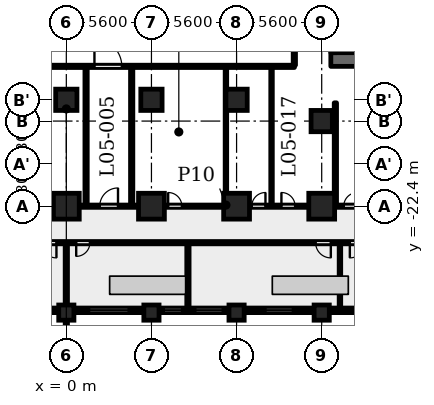
"""IFC4 building model, lengths in metres.
Left out: names, types, materials, properties, quantities, classifications, styles, units other than length and angle.
Written with IfcOpenShell. Run it as: python <this file> out.ifc"""

import sys

from ifc_helpers import new_model, si_unit, direction, frame, frame_2d, origin, origin_2d, place, context, subcontext, project, spatial, rectangle, circle, extrude, element, fill, save


model = new_model("IFC4")
c1 = context("Model", 3, precision=1e-05, world=origin(), true_north=direction((0.0, 1.0)))
c2 = subcontext(c1, "Body", "Model", "MODEL_VIEW")
j1 = project(units=[si_unit("LENGTHUNIT", "METRE"), si_unit("PLANEANGLEUNIT", "RADIAN")], contexts=[c1])
p1 = place(None, origin())
s1 = spatial("IfcSite", under=j1, at=p1, CompositionType="ELEMENT")
p2 = place(p1, origin())
s2 = spatial("IfcBuilding", under=s1, at=p2, CompositionType="ELEMENT")
p3 = place(p2, frame((0.0, 0.0, 25.7)))
s3 = spatial("IfcBuildingStorey", under=s2, at=p3, CompositionType="ELEMENT", Elevation=25.7)
for number, where, z_axis, x_axis in (
    (1, (0.0, -22.4, 0.0), (0.0, 0.0, 1.0), (1.0, 0.0, 0.0)),
    (2, (5.6, -22.4, 0.0), (0.0, 0.0, 1.0), (1.0, 0.0, 0.0)),
    (3, (11.2, -22.4, 0.0), (0.0, 0.0, 1.0), (1.0, 0.0, 0.0)),
    (4, (16.8, -22.4, 0.0), (0.0, 0.0, 1.0), (1.0, 0.0, 0.0)),
):
    element("IfcColumn", number, at=place(p3, frame(where, z_axis=z_axis, x_axis=x_axis)), inside=s3, PredefinedType="COLUMN", context=c2, shape_type="SweptSolid", body=[
        extrude(rectangle(XDim=1.7, YDim=1.7, at=origin_2d()), origin(), (0.0, 0.0, 1.0), 4.8),
    ])
for number, where, z_axis, x_axis in (
    (5, (16.8, -16.8, 0.0), (0.0, 0.0, 1.0), (1.0, 0.0, 0.0)),
    (6, (0.0, -15.4, 0.0), (0.0, 0.0, 1.0), (1.0, 0.0, 0.0)),
    (7, (5.6, -15.4, 0.0), (0.0, 0.0, 1.0), (1.0, 0.0, 0.0)),
    (8, (11.2, -15.4, 0.0), (0.0, 0.0, 1.0), (1.0, 0.0, 0.0)),
):
    element("IfcColumn", number, at=place(p3, frame(where, z_axis=z_axis, x_axis=x_axis)), inside=s3, PredefinedType="COLUMN", context=c2, shape_type="SweptSolid", body=[
        extrude(rectangle(XDim=1.4, YDim=1.4, at=origin_2d()), origin(), (0.0, 0.0, 1.0), 4.8),
    ])
for number, where, z_axis, x_axis in (
    (9, (0.0, -29.4, 0.0), (0.0, 0.0, 1.0), (1.0, 0.0, 0.0)),
    (10, (5.6, -29.4, 0.0), (0.0, 0.0, 1.0), (1.0, 0.0, 0.0)),
    (11, (11.2, -29.4, 0.0), (0.0, 0.0, 1.0), (1.0, 0.0, 0.0)),
    (12, (16.8, -29.4, 0.0), (0.0, 0.0, 1.0), (1.0, 0.0, 0.0)),
):
    element("IfcColumn", number, at=place(p3, frame(where, z_axis=z_axis, x_axis=x_axis)), inside=s3, PredefinedType="COLUMN", context=c2, shape_type="SweptSolid", body=[
        extrude(circle(Radius=0.5, at=origin_2d()), origin(), (0.0, 0.0, 1.0), 4.8),
    ])
p4 = place(p3, frame((-5.1, -29.25, 0.0), z_axis=(0.0, 0.0, 1.0), x_axis=(1.0, 0.0, 0.0)))
e13 = element("IfcWall", 13, at=p4, inside=s3, PredefinedType="SOLIDWALL", context=c2, shape_type="SweptSolid", body=[
    extrude(rectangle(XDim=4.6, YDim=0.3, at=frame_2d((2.3, 0.0))), origin(), (0.0, 0.0, 1.0), 3.65),
])
p5 = place(p4, frame((1.0, 0.0, 0.9)))
e14 = element("IfcOpeningElement", 14, at=p5, cuts=e13, PredefinedType="OPENING", context=c2, shape_type="SweptSolid", body=[
    extrude(rectangle(XDim=2.6, YDim=1.25, at=frame_2d((1.3, 0.625))), frame((0.0, 0.16, 0.0), z_axis=(0.0, -1.0, 0.0), x_axis=(1.0, 0.0, 0.0)), (0.0, 0.0, 1.0), 0.32),
])
p6 = place(p3, frame((0.5, -29.25, 0.0), z_axis=(0.0, 0.0, 1.0), x_axis=(1.0, 0.0, 0.0)))
e15 = element("IfcWall", 15, at=p6, inside=s3, PredefinedType="SOLIDWALL", context=c2, shape_type="SweptSolid", body=[
    extrude(rectangle(XDim=4.6, YDim=0.3, at=frame_2d((2.3, 0.0))), origin(), (0.0, 0.0, 1.0), 3.65),
])
p7 = place(p6, frame((1.0, 0.0, 0.9)))
e16 = element("IfcOpeningElement", 16, at=p7, cuts=e15, PredefinedType="OPENING", context=c2, shape_type="SweptSolid", body=[
    extrude(rectangle(XDim=2.6, YDim=1.25, at=frame_2d((1.3, 0.625))), frame((0.0, 0.16, 0.0), z_axis=(0.0, -1.0, 0.0), x_axis=(1.0, 0.0, 0.0)), (0.0, 0.0, 1.0), 0.32),
])
p8 = place(p3, frame((6.1, -29.25, 0.0), z_axis=(0.0, 0.0, 1.0), x_axis=(1.0, 0.0, 0.0)))
e17 = element("IfcWall", 17, at=p8, inside=s3, PredefinedType="SOLIDWALL", context=c2, shape_type="SweptSolid", body=[
    extrude(rectangle(XDim=4.6, YDim=0.3, at=frame_2d((2.3, 0.0))), origin(), (0.0, 0.0, 1.0), 3.65),
])
p9 = place(p8, frame((0.312, 0.0, 0.6)))
e18 = element("IfcOpeningElement", 18, at=p9, cuts=e17, PredefinedType="OPENING", context=c2, shape_type="SweptSolid", body=[
    extrude(rectangle(XDim=1.2, YDim=1.55, at=frame_2d((0.6, 0.775))), frame((0.0, 0.16, 0.0), z_axis=(0.0, -1.0, 0.0), x_axis=(1.0, 0.0, 0.0)), (0.0, 0.0, 1.0), 0.32),
])
p10 = place(p8, frame((2.387, 0.0, 0.9)))
e19 = element("IfcOpeningElement", 19, at=p10, cuts=e17, PredefinedType="OPENING", context=c2, shape_type="SweptSolid", body=[
    extrude(rectangle(XDim=1.8, YDim=1.25, at=frame_2d((0.9, 0.625))), frame((0.0, 0.16, 0.0), z_axis=(0.0, -1.0, 0.0), x_axis=(1.0, 0.0, 0.0)), (0.0, 0.0, 1.0), 0.32),
])
p11 = place(p3, frame((11.7, -29.25, 0.0), z_axis=(0.0, 0.0, 1.0), x_axis=(1.0, 0.0, 0.0)))
e20 = element("IfcWall", 20, at=p11, inside=s3, PredefinedType="SOLIDWALL", context=c2, shape_type="SweptSolid", body=[
    extrude(rectangle(XDim=4.6, YDim=0.3, at=frame_2d((2.3, 0.0))), origin(), (0.0, 0.0, 1.0), 3.65),
])
p12 = place(p11, frame((1.4, 0.0, 0.9)))
e21 = element("IfcOpeningElement", 21, at=p12, cuts=e20, PredefinedType="OPENING", context=c2, shape_type="SweptSolid", body=[
    extrude(rectangle(XDim=1.8, YDim=1.25, at=frame_2d((0.9, 0.625))), frame((0.0, 0.16, 0.0), z_axis=(0.0, -1.0, 0.0), x_axis=(1.0, 0.0, 0.0)), (0.0, 0.0, 1.0), 0.32),
])
p13 = place(p3, frame((17.3, -29.25, 0.0), z_axis=(0.0, 0.0, 1.0), x_axis=(1.0, 0.0, 0.0)))
e22 = element("IfcWall", 22, at=p13, inside=s3, PredefinedType="SOLIDWALL", context=c2, shape_type="SweptSolid", body=[
    extrude(rectangle(XDim=4.6, YDim=0.3, at=frame_2d((2.3, 0.0))), origin(), (0.0, 0.0, 1.0), 3.65),
])
p14 = place(p13, frame((1.788, 0.0, 0.9)))
e23 = element("IfcOpeningElement", 23, at=p14, cuts=e22, PredefinedType="OPENING", context=c2, shape_type="SweptSolid", body=[
    extrude(rectangle(XDim=1.8, YDim=1.25, at=frame_2d((0.9, 0.625))), frame((0.0, 0.16, 0.0), z_axis=(0.0, -1.0, 0.0), x_axis=(1.0, 0.0, 0.0)), (0.0, 0.0, 1.0), 0.32),
])
p15 = place(p3, frame((17.4, -12.75, 0.0), z_axis=(0.0, 0.0, 1.0), x_axis=(1.0, 0.0, 0.0)))
e24 = element("IfcWall", 24, at=p15, inside=s3, PredefinedType="SHEAR", context=c2, shape_type="SweptSolid", body=[
    extrude(rectangle(XDim=10.4, YDim=0.9, at=frame_2d((5.2, 0.0))), origin(), (0.0, 0.0, 1.0), 4.45),
])
p16 = place(p3, frame((17.6, -12.3, 0.0), z_axis=(0.0, 0.0, 1.0), x_axis=(0.0, 1.0, 0.0)))
e25 = element("IfcWall", 25, at=p16, inside=s3, PredefinedType="SHEAR", context=c2, shape_type="SweptSolid", body=[
    extrude(rectangle(XDim=24.6, YDim=0.4, at=frame_2d((12.3, 0.0))), origin(), (0.0, 0.0, 1.0), 4.45),
])
p17 = place(p16, frame((6.0, 0.0, 0.0)))
e26 = element("IfcOpeningElement", 26, at=p17, cuts=e25, PredefinedType="OPENING", context=c2, shape_type="SweptSolid", body=[
    extrude(rectangle(XDim=1.1, YDim=2.1, at=frame_2d((0.55, 1.05))), frame((0.0, 0.21, 0.0), z_axis=(0.0, -1.0, 0.0), x_axis=(1.0, 0.0, 0.0)), (0.0, 0.0, 1.0), 0.42),
])
p18 = place(p16, frame((8.4, 0.0, 0.0)))
e27 = element("IfcOpeningElement", 27, at=p18, cuts=e25, PredefinedType="OPENING", context=c2, shape_type="SweptSolid", body=[
    extrude(rectangle(XDim=1.1, YDim=2.1, at=frame_2d((0.55, 1.05))), frame((0.0, 0.21, 0.0), z_axis=(0.0, -1.0, 0.0), x_axis=(1.0, 0.0, 0.0)), (0.0, 0.0, 1.0), 0.42),
])
p19 = place(p16, frame((10.8, 0.0, 0.0)))
e28 = element("IfcOpeningElement", 28, at=p19, cuts=e25, PredefinedType="OPENING", context=c2, shape_type="SweptSolid", body=[
    extrude(rectangle(XDim=1.1, YDim=2.1, at=frame_2d((0.55, 1.05))), frame((0.0, 0.21, 0.0), z_axis=(0.0, -1.0, 0.0), x_axis=(1.0, 0.0, 0.0)), (0.0, 0.0, 1.0), 0.42),
])
p20 = place(p16, frame((16.75, 0.0, 0.0)))
e29 = element("IfcOpeningElement", 29, at=p20, cuts=e25, PredefinedType="OPENING", context=c2, shape_type="SweptSolid", body=[
    extrude(rectangle(XDim=0.9, YDim=2.1, at=frame_2d((0.45, 1.05))), frame((0.0, 0.21, 0.0), z_axis=(0.0, -1.0, 0.0), x_axis=(1.0, 0.0, 0.0)), (0.0, 0.0, 1.0), 0.42),
])
p21 = place(p16, frame((22.8, 0.0, 0.0)))
e30 = element("IfcOpeningElement", 30, at=p21, cuts=e25, PredefinedType="OPENING", context=c2, shape_type="SweptSolid", body=[
    extrude(rectangle(XDim=1.1, YDim=2.1, at=frame_2d((0.55, 1.05))), frame((0.0, 0.21, 0.0), z_axis=(0.0, -1.0, 0.0), x_axis=(1.0, 0.0, 0.0)), (0.0, 0.0, 1.0), 0.42),
])
p22 = place(p16, frame((0.7, 0.0, 0.0)))
e31 = element("IfcOpeningElement", 31, at=p22, cuts=e25, PredefinedType="OPENING", context=c2, shape_type="SweptSolid", body=[
    extrude(rectangle(XDim=1.1, YDim=2.1, at=frame_2d((0.55, 1.05))), frame((0.0, 0.21, 0.0), z_axis=(0.0, -1.0, 0.0), x_axis=(1.0, 0.0, 0.0)), (0.0, 0.0, 1.0), 0.42),
])
p23 = place(p16, frame((12.775, 0.0, 0.0)))
e32 = element("IfcOpeningElement", 32, at=p23, cuts=e25, PredefinedType="OPENING", context=c2, shape_type="SweptSolid", body=[
    extrude(rectangle(XDim=1.8, YDim=2.1, at=frame_2d((0.9, 1.05))), frame((0.0, 0.21, 0.0), z_axis=(0.0, -1.0, 0.0), x_axis=(1.0, 0.0, 0.0)), (0.0, 0.0, 1.0), 0.42),
])
p24 = place(p3, frame((-37.0, -24.8, 0.0), z_axis=(0.0, 0.0, 1.0), x_axis=(1.0, 0.0, 0.0)))
e33 = element("IfcWall", 33, at=p24, inside=s3, PredefinedType="PARTITIONING", context=c2, shape_type="SweptSolid", body=[
    extrude(rectangle(XDim=74.0, YDim=0.15, at=frame_2d((37.0, 0.0))), origin(), (0.0, 0.0, 1.0), 4.45),
])
p25 = place(p24, frame((6.65, 0.0, 0.0)))
e34 = element("IfcOpeningElement", 34, at=p25, cuts=e33, PredefinedType="OPENING", context=c2, shape_type="SweptSolid", body=[
    extrude(rectangle(XDim=1.0, YDim=2.1, at=frame_2d((0.5, 1.05))), frame((0.0, 0.085, 0.0), z_axis=(0.0, -1.0, 0.0), x_axis=(1.0, 0.0, 0.0)), (0.0, 0.0, 1.0), 0.17),
])
p26 = place(p24, frame((8.85, 0.0, 0.0)))
e35 = element("IfcOpeningElement", 35, at=p26, cuts=e33, PredefinedType="OPENING", context=c2, shape_type="SweptSolid", body=[
    extrude(rectangle(XDim=0.9, YDim=2.1, at=frame_2d((0.45, 1.05))), frame((0.0, 0.085, 0.0), z_axis=(0.0, -1.0, 0.0), x_axis=(1.0, 0.0, 0.0)), (0.0, 0.0, 1.0), 0.17),
])
p27 = place(p24, frame((35.35, 0.0, 0.0)))
e36 = element("IfcOpeningElement", 36, at=p27, cuts=e33, PredefinedType="OPENING", context=c2, shape_type="SweptSolid", body=[
    extrude(rectangle(XDim=1.0, YDim=2.1, at=frame_2d((0.5, 1.05))), frame((0.0, 0.085, 0.0), z_axis=(0.0, -1.0, 0.0), x_axis=(1.0, 0.0, 0.0)), (0.0, 0.0, 1.0), 0.17),
])
p28 = place(p24, frame((37.65, 0.0, 0.0)))
e37 = element("IfcOpeningElement", 37, at=p28, cuts=e33, PredefinedType="OPENING", context=c2, shape_type="SweptSolid", body=[
    extrude(rectangle(XDim=0.9, YDim=2.1, at=frame_2d((0.45, 1.05))), frame((0.0, 0.085, 0.0), z_axis=(0.0, -1.0, 0.0), x_axis=(1.0, 0.0, 0.0)), (0.0, 0.0, 1.0), 0.17),
])
p29 = place(p24, frame((53.4, 0.0, 0.0)))
e38 = element("IfcOpeningElement", 38, at=p29, cuts=e33, PredefinedType="OPENING", context=c2, shape_type="SweptSolid", body=[
    extrude(rectangle(XDim=1.0, YDim=2.1, at=frame_2d((0.5, 1.05))), frame((0.0, 0.085, 0.0), z_axis=(0.0, -1.0, 0.0), x_axis=(1.0, 0.0, 0.0)), (0.0, 0.0, 1.0), 0.17),
])
p30 = place(p24, frame((55.65, 0.0, 0.0)))
e39 = element("IfcOpeningElement", 39, at=p30, cuts=e33, PredefinedType="OPENING", context=c2, shape_type="SweptSolid", body=[
    extrude(rectangle(XDim=1.0, YDim=2.1, at=frame_2d((0.5, 1.05))), frame((0.0, 0.085, 0.0), z_axis=(0.0, -1.0, 0.0), x_axis=(1.0, 0.0, 0.0)), (0.0, 0.0, 1.0), 0.17),
])
p31 = place(p3, frame((-18.98, -22.4, 0.0), z_axis=(0.0, 0.0, 1.0), x_axis=(1.0, 0.0, 0.0)))
e40 = element("IfcWall", 40, at=p31, inside=s3, PredefinedType="PARTITIONING", context=c2, shape_type="SweptSolid", body=[
    extrude(rectangle(XDim=38.211, YDim=0.15, at=frame_2d((19.105, 0.0))), origin(), (0.0, 0.0, 1.0), 3.55),
])
p32 = place(p31, frame((21.18, 0.0, 0.0)))
e41 = element("IfcOpeningElement", 41, at=p32, cuts=e40, PredefinedType="OPENING", context=c2, shape_type="SweptSolid", body=[
    extrude(rectangle(XDim=1.2, YDim=2.1, at=frame_2d((0.6, 1.05))), frame((0.0, 0.085, 0.0), z_axis=(0.0, -1.0, 0.0), x_axis=(1.0, 0.0, 0.0)), (0.0, 0.0, 1.0), 0.17),
])
p33 = place(p31, frame((0.08, 0.0, 0.0)))
e42 = element("IfcOpeningElement", 42, at=p33, cuts=e40, PredefinedType="OPENING", context=c2, shape_type="SweptSolid", body=[
    extrude(rectangle(XDim=1.0, YDim=2.1, at=frame_2d((0.5, 1.05))), frame((0.0, 0.085, 0.0), z_axis=(0.0, -1.0, 0.0), x_axis=(1.0, 0.0, 0.0)), (0.0, 0.0, 1.0), 0.17),
])
p34 = place(p31, frame((16.88, 0.0, 0.0)))
e43 = element("IfcOpeningElement", 43, at=p34, cuts=e40, PredefinedType="OPENING", context=c2, shape_type="SweptSolid", body=[
    extrude(rectangle(XDim=1.0, YDim=2.1, at=frame_2d((0.5, 1.05))), frame((0.0, 0.085, 0.0), z_axis=(0.0, -1.0, 0.0), x_axis=(1.0, 0.0, 0.0)), (0.0, 0.0, 1.0), 0.17),
])
p35 = place(p31, frame((25.68, 0.0, 0.0)))
e44 = element("IfcOpeningElement", 44, at=p35, cuts=e40, PredefinedType="OPENING", context=c2, shape_type="SweptSolid", body=[
    extrude(rectangle(XDim=0.9, YDim=2.1, at=frame_2d((0.45, 1.05))), frame((0.0, 0.085, 0.0), z_axis=(0.0, -1.0, 0.0), x_axis=(1.0, 0.0, 0.0)), (0.0, 0.0, 1.0), 0.17),
])
p36 = place(p31, frame((31.18, 0.0, 0.0)))
e45 = element("IfcOpeningElement", 45, at=p36, cuts=e40, PredefinedType="OPENING", context=c2, shape_type="SweptSolid", body=[
    extrude(rectangle(XDim=0.9, YDim=2.1, at=frame_2d((0.45, 1.05))), frame((0.0, 0.085, 0.0), z_axis=(0.0, -1.0, 0.0), x_axis=(1.0, 0.0, 0.0)), (0.0, 0.0, 1.0), 0.17),
])
p37 = place(p31, frame((33.13, 0.0, 0.0)))
e46 = element("IfcOpeningElement", 46, at=p37, cuts=e40, PredefinedType="OPENING", context=c2, shape_type="SweptSolid", body=[
    extrude(rectangle(XDim=0.9, YDim=2.1, at=frame_2d((0.45, 1.05))), frame((0.0, 0.085, 0.0), z_axis=(0.0, -1.0, 0.0), x_axis=(1.0, 0.0, 0.0)), (0.0, 0.0, 1.0), 0.17),
])
p38 = place(p31, frame((37.231, 0.0, 0.0)))
e47 = element("IfcOpeningElement", 47, at=p38, cuts=e40, PredefinedType="OPENING", context=c2, shape_type="SweptSolid", body=[
    extrude(rectangle(XDim=0.9, YDim=2.1, at=frame_2d((0.45, 1.05))), frame((0.0, 0.085, 0.0), z_axis=(0.0, -1.0, 0.0), x_axis=(1.0, 0.0, 0.0)), (0.0, 0.0, 1.0), 0.17),
])
p39 = place(p3, frame((-15.005, -13.2, 0.0), z_axis=(0.0, 0.0, 1.0), x_axis=(1.0, 0.0, 0.0)))
e48 = element("IfcWall", 48, at=p39, inside=s3, PredefinedType="PARTITIONING", context=c2, shape_type="SweptSolid", body=[
    extrude(rectangle(XDim=30.01, YDim=0.15, at=frame_2d((15.005, 0.0))), origin(), (0.0, 0.0, 1.0), 4.45),
])
p40 = place(p39, frame((16.855, 0.0, 0.0)))
e49 = element("IfcOpeningElement", 49, at=p40, cuts=e48, PredefinedType="OPENING", context=c2, shape_type="SweptSolid", body=[
    extrude(rectangle(XDim=1.8, YDim=2.1, at=frame_2d((0.9, 1.05))), frame((0.0, 0.085, 0.0), z_axis=(0.0, -1.0, 0.0), x_axis=(1.0, 0.0, 0.0)), (0.0, 0.0, 1.0), 0.17),
])
p41 = place(p3, frame((0.0, -30.23, 0.0), z_axis=(0.0, 0.0, 1.0), x_axis=(0.0, 1.0, 0.0)))
e50 = element("IfcWall", 50, at=p41, inside=s3, PredefinedType="PARTITIONING", context=c2, shape_type="SweptSolid", body=[
    extrude(rectangle(XDim=5.355, YDim=0.15, at=frame_2d((2.677, 0.0))), origin(), (0.0, 0.0, 1.0), 4.45),
])
for number, where, z_axis, x_axis in (
    (51, (1.3, -22.325, 0.0), (0.0, 0.0, 1.0), (0.0, 1.0, 0.0)),
    (52, (4.3, -22.325, 0.0), (0.0, 0.0, 1.0), (0.0, 1.0, 0.0)),
):
    element("IfcWall", number, at=place(p3, frame(where, z_axis=z_axis, x_axis=x_axis)), inside=s3, PredefinedType="PARTITIONING", context=c2, shape_type="SweptSolid", body=[
        extrude(rectangle(XDim=9.05, YDim=0.15, at=frame_2d((4.525, 0.0))), origin(), (0.0, 0.0, 1.0), 4.45),
    ])
p42 = place(p3, frame((8.0, -29.08, 0.0), z_axis=(0.0, 0.0, 1.0), x_axis=(0.0, 1.0, 0.0)))
e53 = element("IfcWall", 53, at=p42, inside=s3, PredefinedType="PARTITIONING", context=c2, shape_type="SweptSolid", body=[
    extrude(rectangle(XDim=4.205, YDim=0.15, at=frame_2d((2.103, 0.0))), origin(), (0.0, 0.0, 1.0), 4.45),
])
for number, where, z_axis, x_axis in (
    (54, (10.5, -22.325, 0.0), (0.0, 0.0, 1.0), (0.0, 1.0, 0.0)),
    (55, (13.5, -22.325, 0.0), (0.0, 0.0, 1.0), (0.0, 1.0, 0.0)),
):
    element("IfcWall", number, at=place(p3, frame(where, z_axis=z_axis, x_axis=x_axis)), inside=s3, PredefinedType="PARTITIONING", context=c2, shape_type="SweptSolid", body=[
        extrude(rectangle(XDim=9.05, YDim=0.1, at=frame_2d((4.525, 0.0))), origin(), (0.0, 0.0, 1.0), 4.45),
    ])
p43 = place(p3, frame((15.0, -13.125, 0.0), z_axis=(0.0, 0.0, 1.0), x_axis=(0.0, 1.0, 0.0)))
e56 = element("IfcWall", 56, at=p43, inside=s3, PredefinedType="PARTITIONING", context=c2, shape_type="SweptSolid", body=[
    extrude(rectangle(XDim=6.356, YDim=0.15, at=frame_2d((3.178, 0.0))), origin(), (0.0, 0.0, 1.0), 4.45),
])
p44 = place(p3, frame((17.7, -22.325, 0.0), z_axis=(0.0, 0.0, 1.0), x_axis=(0.0, 1.0, 0.0)))
e57 = element("IfcWall", 57, at=p44, inside=s3, PredefinedType="PARTITIONING", context=c2, shape_type="SweptSolid", body=[
    extrude(rectangle(XDim=6.725, YDim=0.15, at=frame_2d((3.362, 0.0))), origin(), (0.0, 0.0, 1.0), 4.45),
])
p45 = place(p3, frame((18.0, -29.08, 0.0), z_axis=(0.0, 0.0, 1.0), x_axis=(0.0, 1.0, 0.0)))
e58 = element("IfcWall", 58, at=p45, inside=s3, PredefinedType="PARTITIONING", context=c2, shape_type="SweptSolid", body=[
    extrude(rectangle(XDim=4.205, YDim=0.1, at=frame_2d((2.103, 0.0))), origin(), (0.0, 0.0, 1.0), 4.45),
])
p46 = place(p40, origin())
e59 = element("IfcDoor", 59, at=p46, inside=s3, OperationType="SINGLE_SWING_RIGHT", PredefinedType="DOOR", context=c2, shape_type="SweptSolid", body=[
    extrude(rectangle(XDim=1.8, YDim=2.1, at=frame_2d((0.9, 1.05))), frame((0.0, 0.025, 0.0), z_axis=(0.0, -1.0, 0.0), x_axis=(1.0, 0.0, 0.0)), (0.0, 0.0, 1.0), 0.05),
])
fill(e49, e59)
p47 = place(p32, origin())
e60 = element("IfcDoor", 60, at=p47, inside=s3, OperationType="SINGLE_SWING_LEFT", PredefinedType="DOOR", context=c2, shape_type="SweptSolid", body=[
    extrude(rectangle(XDim=1.2, YDim=2.1, at=frame_2d((0.6, 1.05))), frame((0.0, 0.025, 0.0), z_axis=(0.0, -1.0, 0.0), x_axis=(1.0, 0.0, 0.0)), (0.0, 0.0, 1.0), 0.05),
])
fill(e41, e60)
p48 = place(p27, origin())
e61 = element("IfcDoor", 61, at=p48, inside=s3, OperationType="SINGLE_SWING_RIGHT", PredefinedType="DOOR", context=c2, shape_type="SweptSolid", body=[
    extrude(rectangle(XDim=1.0, YDim=2.1, at=frame_2d((0.5, 1.05))), frame((0.0, 0.025, 0.0), z_axis=(0.0, -1.0, 0.0), x_axis=(1.0, 0.0, 0.0)), (0.0, 0.0, 1.0), 0.05),
])
fill(e36, e61)
p49 = place(p28, origin())
e62 = element("IfcDoor", 62, at=p49, inside=s3, OperationType="SINGLE_SWING_LEFT", PredefinedType="DOOR", context=c2, shape_type="SweptSolid", body=[
    extrude(rectangle(XDim=0.9, YDim=2.1, at=frame_2d((0.45, 1.05))), frame((0.0, 0.025, 0.0), z_axis=(0.0, -1.0, 0.0), x_axis=(1.0, 0.0, 0.0)), (0.0, 0.0, 1.0), 0.05),
])
fill(e37, e62)
p50 = place(p29, origin())
e63 = element("IfcDoor", 63, at=p50, inside=s3, OperationType="SINGLE_SWING_RIGHT", PredefinedType="DOOR", context=c2, shape_type="SweptSolid", body=[
    extrude(rectangle(XDim=1.0, YDim=2.1, at=frame_2d((0.5, 1.05))), frame((0.0, 0.025, 0.0), z_axis=(0.0, -1.0, 0.0), x_axis=(1.0, 0.0, 0.0)), (0.0, 0.0, 1.0), 0.05),
])
fill(e38, e63)
p51 = place(p30, origin())
e64 = element("IfcDoor", 64, at=p51, inside=s3, OperationType="SINGLE_SWING_LEFT", PredefinedType="DOOR", context=c2, shape_type="SweptSolid", body=[
    extrude(rectangle(XDim=1.0, YDim=2.1, at=frame_2d((0.5, 1.05))), frame((0.0, 0.025, 0.0), z_axis=(0.0, -1.0, 0.0), x_axis=(1.0, 0.0, 0.0)), (0.0, 0.0, 1.0), 0.05),
])
fill(e39, e64)
p52 = place(p35, origin())
e65 = element("IfcDoor", 65, at=p52, inside=s3, OperationType="SINGLE_SWING_RIGHT", PredefinedType="DOOR", context=c2, shape_type="SweptSolid", body=[
    extrude(rectangle(XDim=0.9, YDim=2.1, at=frame_2d((0.45, 1.05))), frame((0.0, 0.025, 0.0), z_axis=(0.0, -1.0, 0.0), x_axis=(1.0, 0.0, 0.0)), (0.0, 0.0, 1.0), 0.05),
])
fill(e44, e65)
p53 = place(p36, origin())
e66 = element("IfcDoor", 66, at=p53, inside=s3, OperationType="SINGLE_SWING_LEFT", PredefinedType="DOOR", context=c2, shape_type="SweptSolid", body=[
    extrude(rectangle(XDim=0.9, YDim=2.1, at=frame_2d((0.45, 1.05))), frame((0.0, 0.025, 0.0), z_axis=(0.0, -1.0, 0.0), x_axis=(1.0, 0.0, 0.0)), (0.0, 0.0, 1.0), 0.05),
])
fill(e45, e66)
p54 = place(p37, origin())
e67 = element("IfcDoor", 67, at=p54, inside=s3, OperationType="SINGLE_SWING_RIGHT", PredefinedType="DOOR", context=c2, shape_type="SweptSolid", body=[
    extrude(rectangle(XDim=0.9, YDim=2.1, at=frame_2d((0.45, 1.05))), frame((0.0, 0.025, 0.0), z_axis=(0.0, -1.0, 0.0), x_axis=(1.0, 0.0, 0.0)), (0.0, 0.0, 1.0), 0.05),
])
fill(e46, e67)
p55 = place(p38, origin())
e68 = element("IfcDoor", 68, at=p55, inside=s3, OperationType="SINGLE_SWING_LEFT", PredefinedType="DOOR", context=c2, shape_type="SweptSolid", body=[
    extrude(rectangle(XDim=0.9, YDim=2.1, at=frame_2d((0.45, 1.05))), frame((0.0, 0.025, 0.0), z_axis=(0.0, -1.0, 0.0), x_axis=(1.0, 0.0, 0.0)), (0.0, 0.0, 1.0), 0.05),
])
fill(e47, e68)
p56 = place(p7, origin())
e69 = element("IfcWindow", 69, at=p56, inside=s3, PartitioningType="SINGLE_PANEL", PredefinedType="WINDOW", context=c2, shape_type="SweptSolid", body=[
    extrude(rectangle(XDim=2.6, YDim=1.25, at=frame_2d((1.3, 0.625))), frame((0.0, 0.03, 0.0), z_axis=(0.0, -1.0, 0.0), x_axis=(1.0, 0.0, 0.0)), (0.0, 0.0, 1.0), 0.06),
])
fill(e16, e69)
p57 = place(p9, origin())
e70 = element("IfcWindow", 70, at=p57, inside=s3, PartitioningType="SINGLE_PANEL", PredefinedType="WINDOW", context=c2, shape_type="SweptSolid", body=[
    extrude(rectangle(XDim=1.2, YDim=1.55, at=frame_2d((0.6, 0.775))), frame((0.0, 0.03, 0.0), z_axis=(0.0, -1.0, 0.0), x_axis=(1.0, 0.0, 0.0)), (0.0, 0.0, 1.0), 0.06),
])
fill(e18, e70)
p58 = place(p10, origin())
e71 = element("IfcWindow", 71, at=p58, inside=s3, PartitioningType="SINGLE_PANEL", PredefinedType="WINDOW", context=c2, shape_type="SweptSolid", body=[
    extrude(rectangle(XDim=1.8, YDim=1.25, at=frame_2d((0.9, 0.625))), frame((0.0, 0.03, 0.0), z_axis=(0.0, -1.0, 0.0), x_axis=(1.0, 0.0, 0.0)), (0.0, 0.0, 1.0), 0.06),
])
fill(e19, e71)
p59 = place(p12, origin())
e72 = element("IfcWindow", 72, at=p59, inside=s3, PartitioningType="SINGLE_PANEL", PredefinedType="WINDOW", context=c2, shape_type="SweptSolid", body=[
    extrude(rectangle(XDim=1.8, YDim=1.25, at=frame_2d((0.9, 0.625))), frame((0.0, 0.03, 0.0), z_axis=(0.0, -1.0, 0.0), x_axis=(1.0, 0.0, 0.0)), (0.0, 0.0, 1.0), 0.06),
])
fill(e21, e72)
save(model, sys.argv[1])
